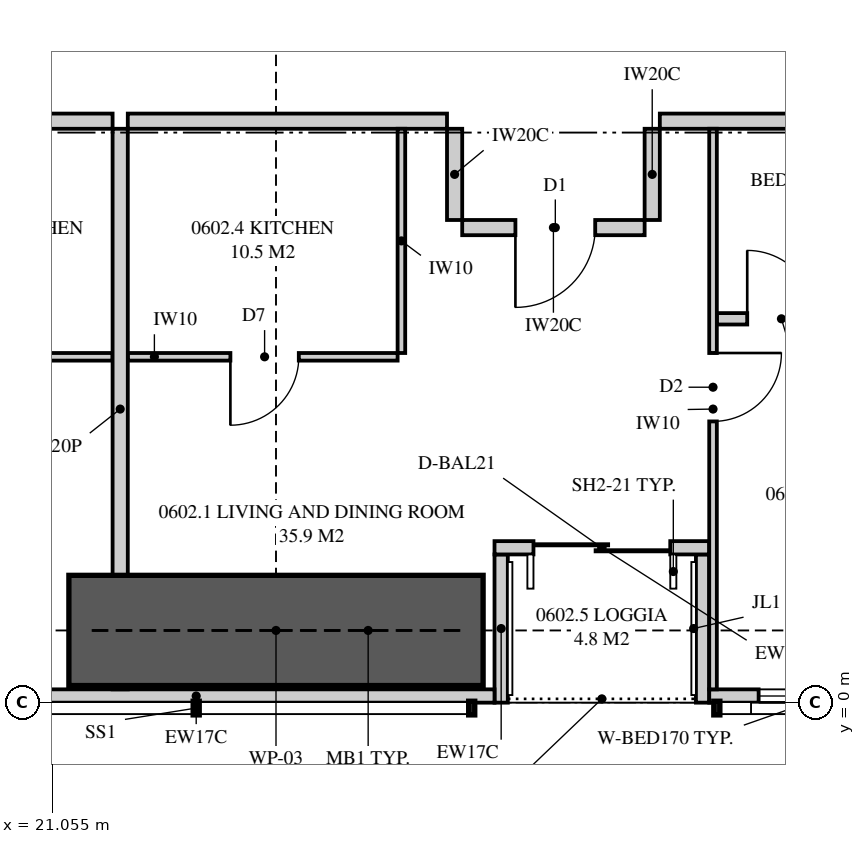
"""IFC4 building model, lengths in metres.
Left out: names, types, materials, properties, quantities, classifications, styles, units other than length and angle.
Written with IfcOpenShell. Run it as: python <this file> out.ifc"""

import sys

from ifc_helpers import new_model, si_unit, direction, frame, frame_2d, origin, place, context, subcontext, project, spatial, polyline, rectangle, outline, extrude, element, fill, save


model = new_model("IFC4")
c1 = context("Model", 3, precision=1e-05, world=origin(), true_north=direction((0.0, 1.0)))
c2 = subcontext(c1, "Body", "Model", "MODEL_VIEW")
j1 = project(units=[si_unit("LENGTHUNIT", "METRE"), si_unit("PLANEANGLEUNIT", "RADIAN")], contexts=[c1])
p1 = place(None, origin())
s1 = spatial("IfcSite", under=j1, at=p1, CompositionType="ELEMENT")
p2 = place(p1, origin())
s2 = spatial("IfcBuilding", under=s1, at=p2, CompositionType="ELEMENT")
p3 = place(p2, frame((0.0, 0.0, 27.7)))
s3 = spatial("IfcBuildingStorey", under=s2, at=p3, CompositionType="ELEMENT", Elevation=27.7)
p4 = place(p3, frame((19.025, 0.087, 0.0), z_axis=(0.0, 0.0, 1.0), x_axis=(1.0, 0.0, 0.0)))
e1 = element("IfcWall", 1, at=p4, inside=s3, PredefinedType="SOLIDWALL", context=c2, shape_type="SweptSolid", body=[
    extrude(rectangle(XDim=7.85, YDim=0.175, at=frame_2d((3.925, 0.0))), origin(), (0.0, 0.0, 1.0), 2.15),
])
p5 = place(p3, frame((29.7, 0.087, 0.0), z_axis=(0.0, 0.0, 1.0), x_axis=(1.0, 0.0, 0.0)))
e2 = element("IfcWall", 2, at=p5, inside=s3, PredefinedType="SOLIDWALL", context=c2, shape_type="SweptSolid", body=[
    extrude(outline(polyline([(0.0, 0.0), (8.075, 0.0), (8.075, 3.11), (5.504, 3.11), (5.504, 2.15), (5.456, 2.15), (5.456, 3.11), (5.3, 3.11), (5.3, 2.15), (0.0, 2.15), (0.0, 0.0)])), frame((0.0, 0.087, 0.0), z_axis=(0.0, -1.0, 0.0), x_axis=(1.0, 0.0, 0.0)), (0.0, 0.0, 1.0), 0.175),
])
p6 = place(p5, frame((0.65, 0.0, 0.4)))
e3 = element("IfcOpeningElement", 3, at=p6, cuts=e2, PredefinedType="OPENING", context=c2, shape_type="SweptSolid", body=[
    extrude(rectangle(XDim=1.8, YDim=1.7, at=frame_2d((0.9, 0.85))), frame((0.0, 0.097, 0.0), z_axis=(0.0, -1.0, 0.0), x_axis=(1.0, 0.0, 0.0)), (0.0, 0.0, 1.0), 0.195),
])
p7 = place(p3, frame((26.875, 2.038, 0.0), z_axis=(0.0, 0.0, 1.0), x_axis=(1.0, 0.0, 0.0)))
e4 = element("IfcWall", 4, at=p7, inside=s3, PredefinedType="SOLIDWALL", context=c2, shape_type="SweptSolid", body=[
    extrude(rectangle(XDim=2.825, YDim=0.175, at=frame_2d((1.413, 0.0))), origin(), (0.0, 0.0, 1.0), 3.11),
])
p8 = place(p7, frame((0.512, 0.0, 0.0)))
e5 = element("IfcOpeningElement", 5, at=p8, cuts=e4, PredefinedType="OPENING", context=c2, shape_type="SweptSolid", body=[
    extrude(rectangle(XDim=1.8, YDim=2.1, at=frame_2d((0.9, 1.05))), frame((0.0, 0.097, 0.0), z_axis=(0.0, -1.0, 0.0), x_axis=(1.0, 0.0, 0.0)), (0.0, 0.0, 1.0), 0.195),
])
for number, where, z_axis, x_axis in (
    (6, (26.962, 0.0, 0.0), (0.0, 0.0, 1.0), (0.0, 1.0, 0.0)),
    (7, (29.613, 0.0, 0.0), (0.0, 0.0, 1.0), (0.0, 1.0, 0.0)),
):
    element("IfcWall", number, at=place(p3, frame(where, z_axis=z_axis, x_axis=x_axis)), inside=s3, PredefinedType="SOLIDWALL", context=c2, shape_type="SweptSolid", body=[
        extrude(outline(polyline([(0.0, 0.0), (1.95, 0.0), (1.95, 3.11), (1.75, 3.11), (1.75, 2.15), (0.15, 2.15), (0.15, 3.11), (0.0, 3.11), (0.0, 0.0)])), frame((0.0, 0.087, 0.0), z_axis=(0.0, -1.0, 0.0), x_axis=(1.0, 0.0, 0.0)), (0.0, 0.0, 1.0), 0.175),
    ])
p9 = place(p3, frame((21.95, 0.175, 0.0), z_axis=(0.0, 0.0, 1.0), x_axis=(0.0, 1.0, 0.0)))
e8 = element("IfcWall", 8, at=p9, inside=s3, PredefinedType="PARTITIONING", context=c2, shape_type="SweptSolid", body=[
    extrude(outline(polyline([(0.529, 2.15), (0.0, 2.15), (0.0, 0.0), (0.529, 0.0), (0.529, 0.09), (1.021, 0.09), (1.021, 0.0), (7.375, 0.0), (7.375, 3.11), (1.685, 3.11), (1.685, 2.15), (1.021, 2.15), (1.021, 2.06), (0.529, 2.06), (0.529, 2.15)])), frame((0.0, 0.1, 0.0), z_axis=(0.0, -1.0, 0.0), x_axis=(1.0, 0.0, 0.0)), (0.0, 0.0, 1.0), 0.2),
])
p10 = place(p3, frame((17.725, 7.65, 0.0), z_axis=(0.0, 0.0, 1.0), x_axis=(1.0, 0.0, 0.0)))
e9 = element("IfcWall", 9, at=p10, inside=s3, PredefinedType="PARTITIONING", context=c2, shape_type="SweptSolid", body=[
    extrude(rectangle(XDim=4.125, YDim=0.2, at=frame_2d((2.062, 0.0))), origin(), (0.0, 0.0, 1.0), 3.11),
])
p11 = place(p10, frame((0.2, 0.0, 0.0)))
e10 = element("IfcOpeningElement", 10, at=p11, cuts=e9, PredefinedType="OPENING", context=c2, shape_type="SweptSolid", body=[
    extrude(rectangle(XDim=1.05, YDim=2.2, at=frame_2d((0.525, 1.1))), frame((0.0, 0.11, 0.0), z_axis=(0.0, -1.0, 0.0), x_axis=(1.0, 0.0, 0.0)), (0.0, 0.0, 1.0), 0.22),
])
p12 = place(p3, frame((19.2, 4.55, 0.0), z_axis=(0.0, 0.0, 1.0), x_axis=(1.0, 0.0, 0.0)))
e11 = element("IfcWall", 11, at=p12, inside=s3, PredefinedType="PARTITIONING", context=c2, shape_type="SweptSolid", body=[
    extrude(rectangle(XDim=2.65, YDim=0.1, at=frame_2d((1.325, 0.0))), origin(), (0.0, 0.0, 1.0), 3.11),
])
p13 = place(p12, frame((0.85, 0.0, 0.0)))
e12 = element("IfcOpeningElement", 12, at=p13, cuts=e11, PredefinedType="OPENING", context=c2, shape_type="SweptSolid", body=[
    extrude(rectangle(XDim=0.9, YDim=2.1, at=frame_2d((0.45, 1.05))), frame((0.0, 0.06, 0.0), z_axis=(0.0, -1.0, 0.0), x_axis=(1.0, 0.0, 0.0)), (0.0, 0.0, 1.0), 0.12),
])
p14 = place(p3, frame((22.05, 7.65, 0.0), z_axis=(0.0, 0.0, 1.0), x_axis=(1.0, 0.0, 0.0)))
e13 = element("IfcWall", 13, at=p14, inside=s3, PredefinedType="PARTITIONING", context=c2, shape_type="SweptSolid", body=[
    extrude(outline(polyline([(0.0, 0.0), (4.2, 0.0), (4.2, 3.11), (2.287, 3.11), (2.287, 2.541), (1.613, 2.541), (1.613, 3.11), (0.0, 3.11), (0.0, 0.0)])), frame((0.0, 0.1, 0.0), z_axis=(0.0, -1.0, 0.0), x_axis=(1.0, 0.0, 0.0)), (0.0, 0.0, 1.0), 0.2),
])
p15 = place(p3, frame((29.75, 0.175, 0.0), z_axis=(0.0, 0.0, 1.0), x_axis=(0.0, 1.0, 0.0)))
e14 = element("IfcWall", 14, at=p15, inside=s3, PredefinedType="PARTITIONING", context=c2, shape_type="SweptSolid", body=[
    extrude(outline(polyline([(0.0, 0.0), (7.375, 0.0), (7.375, 3.11), (1.635, 3.11), (1.635, 2.15), (0.0, 2.15), (0.0, 3.11), (0.0, 0.0)])), frame((0.0, 0.05, 0.0), z_axis=(0.0, -1.0, 0.0), x_axis=(1.0, 0.0, 0.0)), (0.0, 0.0, 1.0), 0.1),
])
p16 = place(p15, frame((3.525, 0.0, 0.0)))
e15 = element("IfcOpeningElement", 15, at=p16, cuts=e14, PredefinedType="OPENING", context=c2, shape_type="SweptSolid", body=[
    extrude(rectangle(XDim=0.9, YDim=2.1, at=frame_2d((0.45, 1.05))), frame((0.0, 0.06, 0.0), z_axis=(0.0, -1.0, 0.0), x_axis=(1.0, 0.0, 0.0)), (0.0, 0.0, 1.0), 0.12),
])
p17 = place(p3, frame((29.8, 5.05, 0.0), z_axis=(0.0, 0.0, 1.0), x_axis=(1.0, 0.0, 0.0)))
e16 = element("IfcWall", 16, at=p17, inside=s3, PredefinedType="PLUMBINGWALL", context=c2, shape_type="SweptSolid", body=[
    extrude(rectangle(XDim=3.45, YDim=0.15, at=frame_2d((1.725, 0.0))), origin(), (0.0, 0.0, 1.0), 3.11),
])
p18 = place(p17, frame((0.4, 0.0, 0.0)))
e17 = element("IfcOpeningElement", 17, at=p18, cuts=e16, PredefinedType="OPENING", context=c2, shape_type="SweptSolid", body=[
    extrude(rectangle(XDim=0.9, YDim=2.1, at=frame_2d((0.45, 1.05))), frame((0.0, 0.085, 0.0), z_axis=(0.0, -1.0, 0.0), x_axis=(1.0, 0.0, 0.0)), (0.0, 0.0, 1.0), 0.17),
])
p19 = place(p3, frame((22.05, 4.55, 0.0), z_axis=(0.0, 0.0, 1.0), x_axis=(1.0, 0.0, 0.0)))
e18 = element("IfcWall", 18, at=p19, inside=s3, PredefinedType="PARTITIONING", context=c2, shape_type="SweptSolid", body=[
    extrude(outline(polyline([(0.0, 0.0), (3.55, 0.0), (3.55, 3.11), (2.237, 3.11), (2.237, 2.541), (1.663, 2.541), (1.663, 3.11), (0.0, 3.11), (0.0, 0.0)])), frame((0.0, 0.05, 0.0), z_axis=(0.0, -1.0, 0.0), x_axis=(1.0, 0.0, 0.0)), (0.0, 0.0, 1.0), 0.1),
])
p20 = place(p19, frame((1.35, 0.0, 0.0)))
e19 = element("IfcOpeningElement", 19, at=p20, cuts=e18, PredefinedType="OPENING", context=c2, shape_type="SweptSolid", body=[
    extrude(rectangle(XDim=0.9, YDim=2.1, at=frame_2d((0.45, 1.05))), frame((0.0, 0.06, 0.0), z_axis=(0.0, -1.0, 0.0), x_axis=(1.0, 0.0, 0.0)), (0.0, 0.0, 1.0), 0.12),
])
p21 = place(p3, frame((25.65, 4.6, 0.0), z_axis=(0.0, 0.0, 1.0), x_axis=(0.0, 1.0, 0.0)))
e20 = element("IfcWall", 20, at=p21, inside=s3, PredefinedType="PARTITIONING", context=c2, shape_type="SweptSolid", body=[
    extrude(rectangle(XDim=2.95, YDim=0.1, at=frame_2d((1.475, 0.0))), origin(), (0.0, 0.0, 1.0), 3.11),
])
p22 = place(p3, frame((29.05, 7.65, 0.0), z_axis=(0.0, 0.0, 1.0), x_axis=(1.0, 0.0, 0.0)))
e21 = element("IfcWall", 21, at=p22, inside=s3, PredefinedType="PARTITIONING", context=c2, shape_type="SweptSolid", body=[
    extrude(rectangle(XDim=4.2, YDim=0.2, at=frame_2d((2.1, 0.0))), origin(), (0.0, 0.0, 1.0), 3.11),
])
p23 = place(p3, frame((26.45, 6.25, 0.0), z_axis=(0.0, 0.0, 1.0), x_axis=(1.0, 0.0, 0.0)))
e22 = element("IfcWall", 22, at=p23, inside=s3, PredefinedType="PARTITIONING", context=c2, shape_type="SweptSolid", body=[
    extrude(rectangle(XDim=2.4, YDim=0.2, at=frame_2d((1.2, 0.0))), origin(), (0.0, 0.0, 1.0), 3.11),
])
p24 = place(p23, frame((0.7, 0.0, 0.0)))
e23 = element("IfcOpeningElement", 23, at=p24, cuts=e22, PredefinedType="OPENING", context=c2, shape_type="SweptSolid", body=[
    extrude(rectangle(XDim=1.05, YDim=2.2, at=frame_2d((0.525, 1.1))), frame((0.0, 0.11, 0.0), z_axis=(0.0, -1.0, 0.0), x_axis=(1.0, 0.0, 0.0)), (0.0, 0.0, 1.0), 0.22),
])
for number, where, z_axis, x_axis in (
    (24, (26.35, 7.55, 0.0), (0.0, 0.0, 1.0), (0.0, -1.0, 0.0)),
    (25, (28.95, 7.55, 0.0), (0.0, 0.0, 1.0), (0.0, -1.0, 0.0)),
):
    element("IfcWall", number, at=place(p3, frame(where, z_axis=z_axis, x_axis=x_axis)), inside=s3, PredefinedType="PARTITIONING", context=c2, shape_type="SweptSolid", body=[
        extrude(rectangle(XDim=1.2, YDim=0.2, at=frame_2d((0.6, 0.0))), origin(), (0.0, 0.0, 1.0), 3.11),
    ])
p25 = place(p3, frame((21.275, 0.95, 0.0), z_axis=(0.0, 0.0, 1.0), x_axis=(1.0, 0.0, 0.0)))
e26 = element("IfcWall", 26, at=p25, inside=s3, PredefinedType="SHEAR", context=c2, shape_type="SweptSolid", body=[
    extrude(rectangle(XDim=5.45, YDim=1.45, at=frame_2d((2.725, 0.0))), origin(), (0.0, 0.0, 1.0), 3.35),
])
p26 = place(p8, origin())
e27 = element("IfcDoor", 27, at=p26, inside=s3, OperationType="SLIDING_TO_LEFT", PredefinedType="DOOR", context=c2, shape_type="SweptSolid", body=[
    extrude(rectangle(XDim=1.8, YDim=2.1, at=frame_2d((0.9, 1.05))), frame((0.0, 0.025, 0.0), z_axis=(0.0, -1.0, 0.0), x_axis=(1.0, 0.0, 0.0)), (0.0, 0.0, 1.0), 0.05),
])
fill(e5, e27)
p27 = place(p6, origin())
e28 = element("IfcWindow", 28, at=p27, inside=s3, PartitioningType="SINGLE_PANEL", PredefinedType="WINDOW", context=c2, shape_type="SweptSolid", body=[
    extrude(rectangle(XDim=1.8, YDim=1.7, at=frame_2d((0.9, 0.85))), frame((0.0, 0.03, 0.0), z_axis=(0.0, -1.0, 0.0), x_axis=(1.0, 0.0, 0.0)), (0.0, 0.0, 1.0), 0.06),
])
fill(e3, e28)
p28 = place(p24, frame((1.05, 0.0, 0.0), z_axis=(0.0, 0.0, 1.0), x_axis=(-1.0, 0.0, 0.0)))
e29 = element("IfcDoor", 29, at=p28, inside=s3, OperationType="SINGLE_SWING_RIGHT", PredefinedType="DOOR", context=c2, shape_type="SweptSolid", body=[
    extrude(rectangle(XDim=1.05, YDim=2.2, at=frame_2d((0.525, 1.1))), frame((0.0, 0.025, 0.0), z_axis=(0.0, -1.0, 0.0), x_axis=(1.0, 0.0, 0.0)), (0.0, 0.0, 1.0), 0.05),
])
fill(e23, e29)
p29 = place(p16, frame((0.9, 0.0, 0.0), z_axis=(0.0, 0.0, 1.0), x_axis=(-1.0, 0.0, 0.0)))
e30 = element("IfcDoor", 30, at=p29, inside=s3, OperationType="SINGLE_SWING_LEFT", PredefinedType="DOOR", context=c2, shape_type="SweptSolid", body=[
    extrude(rectangle(XDim=0.9, YDim=2.1, at=frame_2d((0.45, 1.05))), frame((0.0, 0.025, 0.0), z_axis=(0.0, -1.0, 0.0), x_axis=(1.0, 0.0, 0.0)), (0.0, 0.0, 1.0), 0.05),
])
fill(e15, e30)
p30 = place(p18, origin())
e31 = element("IfcDoor", 31, at=p30, inside=s3, OperationType="SINGLE_SWING_LEFT", PredefinedType="DOOR", context=c2, shape_type="SweptSolid", body=[
    extrude(rectangle(XDim=0.9, YDim=2.1, at=frame_2d((0.45, 1.05))), frame((0.0, 0.025, 0.0), z_axis=(0.0, -1.0, 0.0), x_axis=(1.0, 0.0, 0.0)), (0.0, 0.0, 1.0), 0.05),
])
fill(e17, e31)
p31 = place(p20, frame((0.9, 0.0, 0.0), z_axis=(0.0, 0.0, 1.0), x_axis=(-1.0, 0.0, 0.0)))
e32 = element("IfcDoor", 32, at=p31, inside=s3, OperationType="SINGLE_SWING_RIGHT", PredefinedType="DOOR", context=c2, shape_type="SweptSolid", body=[
    extrude(rectangle(XDim=0.9, YDim=2.1, at=frame_2d((0.45, 1.05))), frame((0.0, 0.025, 0.0), z_axis=(0.0, -1.0, 0.0), x_axis=(1.0, 0.0, 0.0)), (0.0, 0.0, 1.0), 0.05),
])
fill(e19, e32)
save(model, sys.argv[1])
